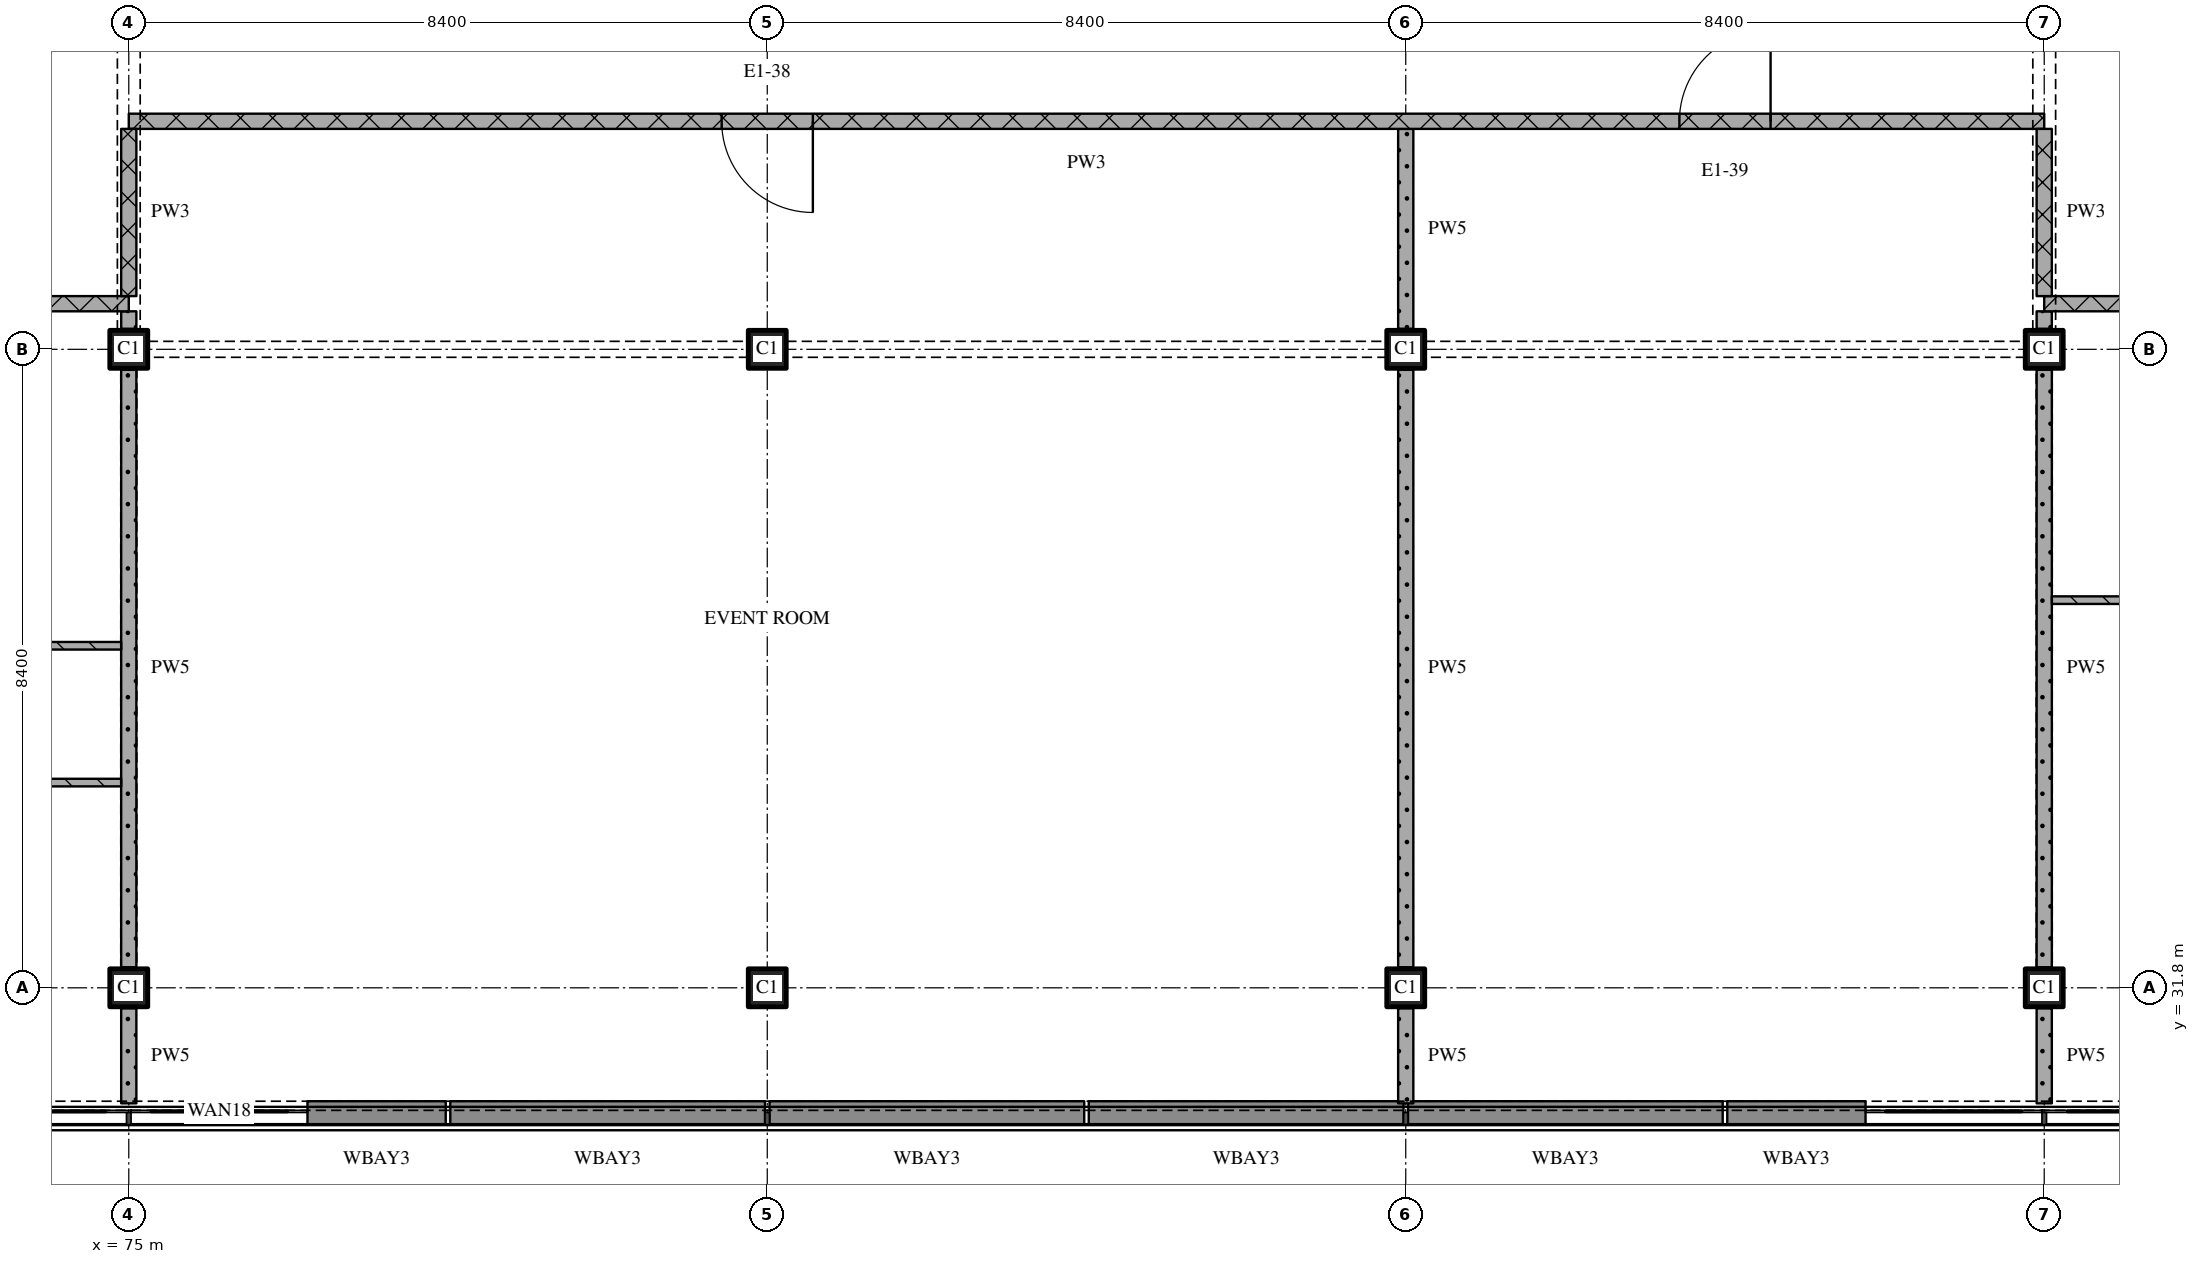
"""IFC4 building model, lengths in metres.
Left out: names, types, materials, properties, quantities, classifications, styles, units other than length and angle.
Written with IfcOpenShell. Run it as: python <this file> out.ifc"""

import sys

from ifc_helpers import new_model, si_unit, direction, frame, frame_2d, origin, origin_2d, place, context, subcontext, project, spatial, rectangle, extrude, element, fill, save


model = new_model("IFC4")
c1 = context("Model", 3, precision=1e-05, world=origin(), true_north=direction((0.0, 1.0)))
c2 = subcontext(c1, "Body", "Model", "MODEL_VIEW")
j1 = project(units=[si_unit("LENGTHUNIT", "METRE"), si_unit("PLANEANGLEUNIT", "RADIAN")], contexts=[c1])
p1 = place(None, origin())
s1 = spatial("IfcSite", under=j1, at=p1, CompositionType="ELEMENT")
p2 = place(p1, origin())
s2 = spatial("IfcBuilding", under=s1, at=p2, CompositionType="ELEMENT")
p3 = place(p2, frame((0.0, 0.0, 263.55)))
s3 = spatial("IfcBuildingStorey", under=s2, at=p3, CompositionType="ELEMENT", Elevation=263.55)
for number, where, z_axis, x_axis in (
    (1, (75.0, 31.8, 0.0), (0.0, 0.0, 1.0), (1.0, 0.0, 0.0)),
    (2, (75.0, 40.2, 0.0), (0.0, 0.0, 1.0), (1.0, 0.0, 0.0)),
    (3, (83.4, 31.8, 0.0), (0.0, 0.0, 1.0), (1.0, 0.0, 0.0)),
    (4, (83.4, 40.2, 0.0), (0.0, 0.0, 1.0), (1.0, 0.0, 0.0)),
    (5, (91.8, 31.8, 0.0), (0.0, 0.0, 1.0), (1.0, 0.0, 0.0)),
    (6, (91.8, 40.2, 0.0), (0.0, 0.0, 1.0), (1.0, 0.0, 0.0)),
    (7, (100.2, 31.8, 0.0), (0.0, 0.0, 1.0), (1.0, 0.0, 0.0)),
    (8, (100.2, 40.2, 0.0), (0.0, 0.0, 1.0), (1.0, 0.0, 0.0)),
):
    element("IfcColumn", number, at=place(p3, frame(where, z_axis=z_axis, x_axis=x_axis)), inside=s3, PredefinedType="COLUMN", context=c2, shape_type="SweptSolid", body=[
        extrude(rectangle(XDim=0.5, YDim=0.5, at=origin_2d()), origin(), (0.0, 0.0, 1.0), 3.6),
    ])
p4 = place(p3, frame((79.17, 30.154, 0.0), z_axis=(0.0, 0.0, 1.0), x_axis=(-1.0, 0.0, 0.0)))
e9 = element("IfcWall", 9, at=p4, inside=s3, PredefinedType="SOLIDWALL", context=c2, shape_type="SweptSolid", body=[
    extrude(rectangle(XDim=1.819, YDim=0.308, at=frame_2d((0.91, 0.0))), origin(), (0.0, 0.0, 1.0), 3.2),
])
for number, where, z_axis, x_axis in (
    (10, (83.37, 30.154, 0.0), (0.0, 0.0, 1.0), (-1.0, 0.0, 0.0)),
    (11, (87.57, 30.154, 0.0), (0.0, 0.0, 1.0), (-1.0, 0.0, 0.0)),
    (12, (91.77, 30.154, 0.0), (0.0, 0.0, 1.0), (-1.0, 0.0, 0.0)),
):
    element("IfcWall", number, at=place(p3, frame(where, z_axis=z_axis, x_axis=x_axis)), inside=s3, PredefinedType="SOLIDWALL", context=c2, shape_type="SweptSolid", body=[
        extrude(rectangle(XDim=4.14, YDim=0.308, at=frame_2d((2.07, 0.0))), origin(), (0.0, 0.0, 1.0), 3.2),
    ])
p5 = place(p3, frame((95.97, 30.154, 0.0), z_axis=(0.0, 0.0, 1.0), x_axis=(-1.0, 0.0, 0.0)))
e13 = element("IfcWall", 13, at=p5, inside=s3, PredefinedType="SOLIDWALL", context=c2, shape_type="SweptSolid", body=[
    extrude(rectangle(XDim=4.14, YDim=0.308, at=frame_2d((2.07, 0.0))), origin(), (0.0, 0.0, 1.0), 3.2),
])
p6 = place(p3, frame((97.849, 30.154, 0.0), z_axis=(0.0, 0.0, 1.0), x_axis=(-1.0, 0.0, 0.0)))
e14 = element("IfcWall", 14, at=p6, inside=s3, PredefinedType="SOLIDWALL", context=c2, shape_type="SweptSolid", body=[
    extrude(rectangle(XDim=1.819, YDim=0.308, at=frame_2d((0.91, 0.0))), origin(), (0.0, 0.0, 1.0), 3.2),
])
p7 = place(p3, frame((74.9, 34.5, 0.0), z_axis=(0.0, 0.0, 1.0), x_axis=(-1.0, 0.0, 0.0)))
e15 = element("IfcWall", 15, at=p7, inside=s3, PredefinedType="PARTITIONING", context=c2, shape_type="SweptSolid", body=[
    extrude(rectangle(XDim=16.7, YDim=0.1, at=frame_2d((8.35, 0.0))), origin(), (0.0, 0.0, 1.0), 3.32),
])
p8 = place(p7, frame((3.65, 0.0, 0.0)))
e16 = element("IfcOpeningElement", 16, at=p8, cuts=e15, PredefinedType="OPENING", context=c2, shape_type="SweptSolid", body=[
    extrude(rectangle(XDim=0.9, YDim=2.1, at=frame_2d((0.45, 1.05))), frame((0.0, 0.06, 0.0), z_axis=(0.0, -1.0, 0.0), x_axis=(1.0, 0.0, 0.0)), (0.0, 0.0, 1.0), 0.12),
])
p9 = place(p7, frame((12.05, 0.0, 0.0)))
e17 = element("IfcOpeningElement", 17, at=p9, cuts=e15, PredefinedType="OPENING", context=c2, shape_type="SweptSolid", body=[
    extrude(rectangle(XDim=0.9, YDim=2.1, at=frame_2d((0.45, 1.05))), frame((0.0, 0.06, 0.0), z_axis=(0.0, -1.0, 0.0), x_axis=(1.0, 0.0, 0.0)), (0.0, 0.0, 1.0), 0.12),
])
p10 = place(p3, frame((69.0, 36.3, 0.0), z_axis=(0.0, 0.0, 1.0), x_axis=(1.0, 0.0, 0.0)))
e18 = element("IfcWall", 18, at=p10, inside=s3, PredefinedType="PARTITIONING", context=c2, shape_type="SweptSolid", body=[
    extrude(rectangle(XDim=5.9, YDim=0.1, at=frame_2d((2.95, 0.0))), origin(), (0.0, 0.0, 1.0), 3.32),
])
p11 = place(p10, frame((2.55, 0.0, 0.0)))
e19 = element("IfcOpeningElement", 19, at=p11, cuts=e18, PredefinedType="OPENING", context=c2, shape_type="SweptSolid", body=[
    extrude(rectangle(XDim=0.9, YDim=2.1, at=frame_2d((0.45, 1.05))), frame((0.0, 0.06, 0.0), z_axis=(0.0, -1.0, 0.0), x_axis=(1.0, 0.0, 0.0)), (0.0, 0.0, 1.0), 0.12),
])
p12 = place(p3, frame((100.3, 36.9, 0.0), z_axis=(0.0, 0.0, 1.0), x_axis=(1.0, 0.0, 0.0)))
e20 = element("IfcWall", 20, at=p12, inside=s3, PredefinedType="PARTITIONING", context=c2, shape_type="SweptSolid", body=[
    extrude(rectangle(XDim=4.1, YDim=0.1, at=frame_2d((2.05, 0.0))), origin(), (0.0, 0.0, 1.0), 3.32),
])
p13 = place(p3, frame((75.0, 40.8, 0.0), z_axis=(0.0, 0.0, 1.0), x_axis=(-1.0, 0.0, 0.0)))
e21 = element("IfcWall", 21, at=p13, inside=s3, PredefinedType="PARTITIONING", context=c2, shape_type="SweptSolid", body=[
    extrude(rectangle(XDim=26.72, YDim=0.2, at=frame_2d((13.36, 0.0))), origin(), (0.0, 0.0, 1.0), 3.32),
])
p14 = place(p13, frame((13.75, 0.0, 0.0)))
e22 = element("IfcOpeningElement", 22, at=p14, cuts=e21, PredefinedType="OPENING", context=c2, shape_type="SweptSolid", body=[
    extrude(rectangle(XDim=1.0, YDim=2.1, at=frame_2d((0.5, 1.05))), frame((0.0, 0.11, 0.0), z_axis=(0.0, -1.0, 0.0), x_axis=(1.0, 0.0, 0.0)), (0.0, 0.0, 1.0), 0.22),
])
p15 = place(p3, frame((126.92, 40.8, 0.0), z_axis=(0.0, 0.0, 1.0), x_axis=(-1.0, 0.0, 0.0)))
e23 = element("IfcWall", 23, at=p15, inside=s3, PredefinedType="PARTITIONING", context=c2, shape_type="SweptSolid", body=[
    extrude(rectangle(XDim=26.72, YDim=0.2, at=frame_2d((13.36, 0.0))), origin(), (0.0, 0.0, 1.0), 3.32),
])
p16 = place(p15, frame((10.47, 0.0, 0.0)))
e24 = element("IfcOpeningElement", 24, at=p16, cuts=e23, PredefinedType="OPENING", context=c2, shape_type="SweptSolid", body=[
    extrude(rectangle(XDim=1.0, YDim=2.1, at=frame_2d((0.5, 1.05))), frame((0.0, 0.11, 0.0), z_axis=(0.0, -1.0, 0.0), x_axis=(1.0, 0.0, 0.0)), (0.0, 0.0, 1.0), 0.22),
])
p17 = place(p3, frame((100.2, 43.2, 0.0), z_axis=(0.0, 0.0, 1.0), x_axis=(-1.0, 0.0, 0.0)))
e25 = element("IfcWall", 25, at=p17, inside=s3, PredefinedType="PARTITIONING", context=c2, shape_type="SweptSolid", body=[
    extrude(rectangle(XDim=25.2, YDim=0.2, at=frame_2d((12.6, 0.0))), origin(), (0.0, 0.0, 1.0), 3.32),
])
p18 = place(p17, frame((3.6, 0.0, 0.0)))
e26 = element("IfcOpeningElement", 26, at=p18, cuts=e25, PredefinedType="OPENING", context=c2, shape_type="SweptSolid", body=[
    extrude(rectangle(XDim=1.2, YDim=2.1, at=frame_2d((0.6, 1.05))), frame((0.0, 0.11, 0.0), z_axis=(0.0, -1.0, 0.0), x_axis=(1.0, 0.0, 0.0)), (0.0, 0.0, 1.0), 0.22),
])
p19 = place(p17, frame((16.2, 0.0, 0.0)))
e27 = element("IfcOpeningElement", 27, at=p19, cuts=e25, PredefinedType="OPENING", context=c2, shape_type="SweptSolid", body=[
    extrude(rectangle(XDim=1.2, YDim=2.1, at=frame_2d((0.6, 1.05))), frame((0.0, 0.11, 0.0), z_axis=(0.0, -1.0, 0.0), x_axis=(1.0, 0.0, 0.0)), (0.0, 0.0, 1.0), 0.22),
])
p20 = place(p3, frame((75.0, 43.1, 0.0), z_axis=(0.0, 0.0, 1.0), x_axis=(0.0, -1.0, 0.0)))
e28 = element("IfcWall", 28, at=p20, inside=s3, PredefinedType="PARTITIONING", context=c2, shape_type="SweptSolid", body=[
    extrude(rectangle(XDim=2.2, YDim=0.2, at=frame_2d((1.1, 0.0))), origin(), (0.0, 0.0, 1.0), 2.53),
])
p21 = place(p3, frame((75.0, 31.53, 0.0), z_axis=(0.0, 0.0, 1.0), x_axis=(0.0, -1.0, 0.0)))
e29 = element("IfcWall", 29, at=p21, inside=s3, PredefinedType="PARTITIONING", context=c2, shape_type="SweptSolid", body=[
    extrude(rectangle(XDim=1.25, YDim=0.2, at=frame_2d((0.625, 0.0))), origin(), (0.0, 0.0, 1.0), 3.32),
])
p22 = place(p3, frame((75.0, 39.93, 0.0), z_axis=(0.0, 0.0, 1.0), x_axis=(0.0, -1.0, 0.0)))
e30 = element("IfcWall", 30, at=p22, inside=s3, PredefinedType="PARTITIONING", context=c2, shape_type="SweptSolid", body=[
    extrude(rectangle(XDim=7.86, YDim=0.2, at=frame_2d((3.93, 0.0))), origin(), (0.0, 0.0, 1.0), 2.77),
])
p23 = place(p3, frame((75.0, 40.7, 0.0), z_axis=(0.0, 0.0, 1.0), x_axis=(0.0, -1.0, 0.0)))
e31 = element("IfcWall", 31, at=p23, inside=s3, PredefinedType="PARTITIONING", context=c2, shape_type="SweptSolid", body=[
    extrude(rectangle(XDim=0.23, YDim=0.2, at=frame_2d((0.115, 0.0))), origin(), (0.0, 0.0, 1.0), 3.32),
])
p24 = place(p3, frame((91.8, 31.53, 0.0), z_axis=(0.0, 0.0, 1.0), x_axis=(0.0, -1.0, 0.0)))
e32 = element("IfcWall", 32, at=p24, inside=s3, PredefinedType="PARTITIONING", context=c2, shape_type="SweptSolid", body=[
    extrude(rectangle(XDim=1.25, YDim=0.2, at=frame_2d((0.625, 0.0))), origin(), (0.0, 0.0, 1.0), 3.32),
])
p25 = place(p3, frame((91.8, 39.93, 0.0), z_axis=(0.0, 0.0, 1.0), x_axis=(0.0, -1.0, 0.0)))
e33 = element("IfcWall", 33, at=p25, inside=s3, PredefinedType="PARTITIONING", context=c2, shape_type="SweptSolid", body=[
    extrude(rectangle(XDim=7.86, YDim=0.2, at=frame_2d((3.93, 0.0))), origin(), (0.0, 0.0, 1.0), 3.32),
])
p26 = place(p3, frame((91.8, 43.1, 0.0), z_axis=(0.0, 0.0, 1.0), x_axis=(0.0, -1.0, 0.0)))
e34 = element("IfcWall", 34, at=p26, inside=s3, PredefinedType="PARTITIONING", context=c2, shape_type="SweptSolid", body=[
    extrude(rectangle(XDim=2.63, YDim=0.2, at=frame_2d((1.315, 0.0))), origin(), (0.0, 0.0, 1.0), 3.32),
])
p27 = place(p3, frame((100.2, 43.1, 0.0), z_axis=(0.0, 0.0, 1.0), x_axis=(0.0, -1.0, 0.0)))
e35 = element("IfcWall", 35, at=p27, inside=s3, PredefinedType="PARTITIONING", context=c2, shape_type="SweptSolid", body=[
    extrude(rectangle(XDim=2.2, YDim=0.2, at=frame_2d((1.1, 0.0))), origin(), (0.0, 0.0, 1.0), 2.53),
])
p28 = place(p3, frame((100.2, 31.53, 0.0), z_axis=(0.0, 0.0, 1.0), x_axis=(0.0, -1.0, 0.0)))
e36 = element("IfcWall", 36, at=p28, inside=s3, PredefinedType="PARTITIONING", context=c2, shape_type="SweptSolid", body=[
    extrude(rectangle(XDim=1.25, YDim=0.2, at=frame_2d((0.625, 0.0))), origin(), (0.0, 0.0, 1.0), 3.32),
])
p29 = place(p3, frame((100.2, 39.93, 0.0), z_axis=(0.0, 0.0, 1.0), x_axis=(0.0, -1.0, 0.0)))
e37 = element("IfcWall", 37, at=p29, inside=s3, PredefinedType="PARTITIONING", context=c2, shape_type="SweptSolid", body=[
    extrude(rectangle(XDim=7.86, YDim=0.2, at=frame_2d((3.93, 0.0))), origin(), (0.0, 0.0, 1.0), 2.77),
])
p30 = place(p3, frame((100.2, 40.7, 0.0), z_axis=(0.0, 0.0, 1.0), x_axis=(0.0, -1.0, 0.0)))
e38 = element("IfcWall", 38, at=p30, inside=s3, PredefinedType="PARTITIONING", context=c2, shape_type="SweptSolid", body=[
    extrude(rectangle(XDim=0.23, YDim=0.2, at=frame_2d((0.115, 0.0))), origin(), (0.0, 0.0, 1.0), 3.32),
])
p31 = place(p18, origin())
e39 = element("IfcDoor", 39, at=p31, inside=s3, OperationType="SINGLE_SWING_RIGHT", PredefinedType="DOOR", context=c2, shape_type="SweptSolid", body=[
    extrude(rectangle(XDim=1.2, YDim=2.1, at=frame_2d((0.6, 1.05))), frame((0.0, 0.025, 0.0), z_axis=(0.0, -1.0, 0.0), x_axis=(1.0, 0.0, 0.0)), (0.0, 0.0, 1.0), 0.05),
])
fill(e26, e39)
p32 = place(p19, origin())
e40 = element("IfcDoor", 40, at=p32, inside=s3, OperationType="SINGLE_SWING_LEFT", PredefinedType="DOOR", context=c2, shape_type="SweptSolid", body=[
    extrude(rectangle(XDim=1.2, YDim=2.1, at=frame_2d((0.6, 1.05))), frame((0.0, 0.025, 0.0), z_axis=(0.0, -1.0, 0.0), x_axis=(1.0, 0.0, 0.0)), (0.0, 0.0, 1.0), 0.05),
])
fill(e27, e40)
save(model, sys.argv[1])
